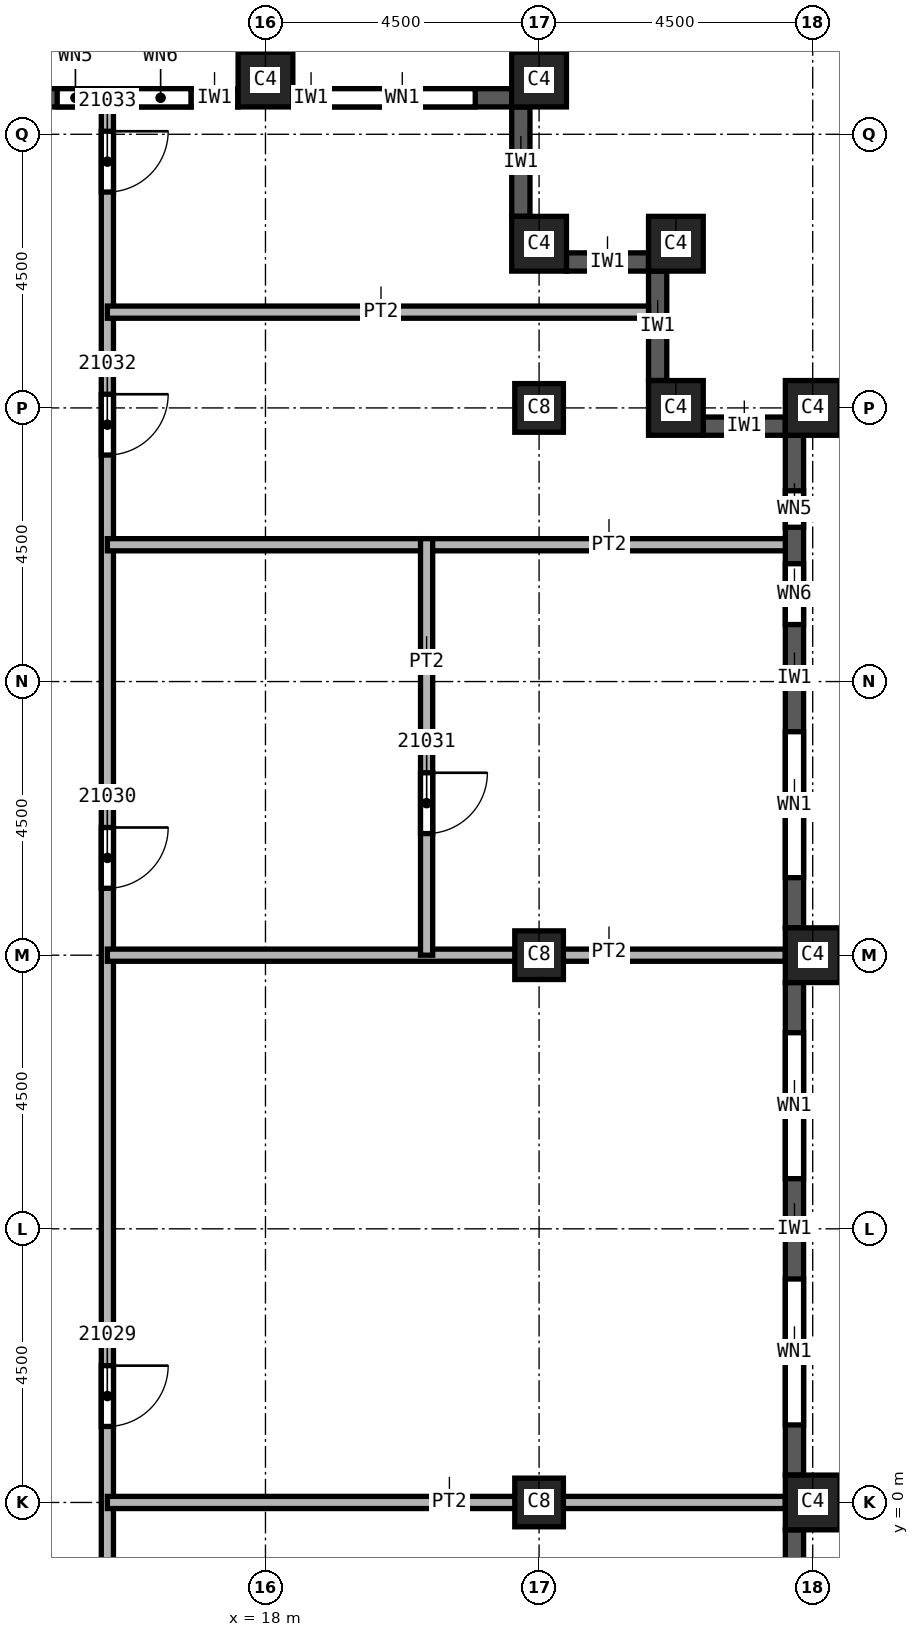
"""IFC4 building model, lengths in metres.
Left out: names, types, materials, properties, quantities, classifications, styles, units other than length and angle.
Written with IfcOpenShell. Run it as: python <this file> out.ifc"""

import sys

from ifc_helpers import new_model, si_unit, direction, frame, frame_2d, origin, origin_2d, place, context, subcontext, project, spatial, rectangle, extrude, element, fill, save


model = new_model("IFC4")
c1 = context("Model", 3, precision=1e-05, world=origin(), true_north=direction((0.0, 1.0)))
c2 = subcontext(c1, "Body", "Model", "MODEL_VIEW")
j1 = project(units=[si_unit("LENGTHUNIT", "METRE"), si_unit("PLANEANGLEUNIT", "RADIAN")], contexts=[c1])
p1 = place(None, origin())
s1 = spatial("IfcSite", under=j1, at=p1, CompositionType="ELEMENT")
p2 = place(p1, origin())
s2 = spatial("IfcBuilding", under=s1, at=p2, CompositionType="ELEMENT")
p3 = place(p2, frame((0.0, 0.0, 308.0)))
s3 = spatial("IfcBuildingStorey", under=s2, at=p3, CompositionType="ELEMENT", Elevation=308.0)
for number, where, z_axis, x_axis in (
    (1, (22.5, 0.0, 0.0), (0.0, 0.0, 1.0), (1.0, 0.0, 0.0)),
    (2, (22.5, 9.0, 0.0), (0.0, 0.0, 1.0), (1.0, 0.0, 0.0)),
    (3, (22.5, 18.0, 0.0), (0.0, 0.0, 1.0), (1.0, 0.0, 0.0)),
):
    element("IfcColumn", number, at=place(p3, frame(where, z_axis=z_axis, x_axis=x_axis)), inside=s3, PredefinedType="COLUMN", context=c2, shape_type="SweptSolid", body=[
        extrude(rectangle(XDim=0.8, YDim=0.8, at=origin_2d()), origin(), (0.0, 0.0, 1.0), 3.74),
    ])
for number, where, z_axis, x_axis in (
    (4, (27.0, 0.0, 0.0), (0.0, 0.0, 1.0), (0.0, 1.0, 0.0)),
    (5, (27.0, 9.0, 0.0), (0.0, 0.0, 1.0), (0.0, 1.0, 0.0)),
    (6, (27.0, 18.0, 0.0), (0.0, 0.0, 1.0), (0.0, 1.0, 0.0)),
    (7, (18.0, 23.4, 0.0), (0.0, 0.0, 1.0), (1.0, 0.0, 0.0)),
    (8, (22.5, 23.4, 0.0), (0.0, 0.0, 1.0), (1.0, 0.0, 0.0)),
    (9, (22.5, 20.7, 0.0), (0.0, 0.0, 1.0), (1.0, 0.0, 0.0)),
    (10, (24.75, 20.7, 0.0), (0.0, 0.0, 1.0), (1.0, 0.0, 0.0)),
    (11, (24.75, 18.0, 0.0), (0.0, 0.0, 1.0), (1.0, 0.0, 0.0)),
):
    element("IfcColumn", number, at=place(p3, frame(where, z_axis=z_axis, x_axis=x_axis)), inside=s3, PredefinedType="COLUMN", context=c2, shape_type="SweptSolid", body=[
        extrude(rectangle(XDim=0.9, YDim=0.9, at=origin_2d()), origin(), (0.0, 0.0, 1.0), 3.74),
    ])
p4 = place(p3, frame((26.7, -8.55, 0.0), z_axis=(0.0, 0.0, 1.0), x_axis=(0.0, 1.0, 0.0)))
e12 = element("IfcWall", 12, at=p4, inside=s3, PredefinedType="SOLIDWALL", context=c2, shape_type="SweptSolid", body=[
    extrude(rectangle(XDim=8.1, YDim=0.3, at=frame_2d((4.05, 0.0))), origin(), (0.0, 0.0, 1.0), 3.14),
])
p5 = place(p4, frame((0.825, 0.0, 0.8)))
e13 = element("IfcOpeningElement", 13, at=p5, cuts=e12, PredefinedType="OPENING", context=c2, shape_type="SweptSolid", body=[
    extrude(rectangle(XDim=2.4, YDim=1.95, at=frame_2d((1.2, 0.975))), frame((0.0, 0.15, 0.0), z_axis=(0.0, -1.0, 0.0), x_axis=(1.0, 0.0, 0.0)), (0.0, 0.0, 1.0), 0.3),
])
p6 = place(p4, frame((4.875, 0.0, 0.8)))
e14 = element("IfcOpeningElement", 14, at=p6, cuts=e12, PredefinedType="OPENING", context=c2, shape_type="SweptSolid", body=[
    extrude(rectangle(XDim=2.4, YDim=1.95, at=frame_2d((1.2, 0.975))), frame((0.0, 0.15, 0.0), z_axis=(0.0, -1.0, 0.0), x_axis=(1.0, 0.0, 0.0)), (0.0, 0.0, 1.0), 0.3),
])
p7 = place(p3, frame((26.7, 0.45, 0.0), z_axis=(0.0, 0.0, 1.0), x_axis=(0.0, 1.0, 0.0)))
e15 = element("IfcWall", 15, at=p7, inside=s3, PredefinedType="SOLIDWALL", context=c2, shape_type="SweptSolid", body=[
    extrude(rectangle(XDim=8.1, YDim=0.3, at=frame_2d((4.05, 0.0))), origin(), (0.0, 0.0, 1.0), 3.14),
])
p8 = place(p7, frame((0.825, 0.0, 0.8)))
e16 = element("IfcOpeningElement", 16, at=p8, cuts=e15, PredefinedType="OPENING", context=c2, shape_type="SweptSolid", body=[
    extrude(rectangle(XDim=2.4, YDim=1.95, at=frame_2d((1.2, 0.975))), frame((0.0, 0.15, 0.0), z_axis=(0.0, -1.0, 0.0), x_axis=(1.0, 0.0, 0.0)), (0.0, 0.0, 1.0), 0.3),
])
p9 = place(p7, frame((4.875, 0.0, 0.8)))
e17 = element("IfcOpeningElement", 17, at=p9, cuts=e15, PredefinedType="OPENING", context=c2, shape_type="SweptSolid", body=[
    extrude(rectangle(XDim=2.4, YDim=1.95, at=frame_2d((1.2, 0.975))), frame((0.0, 0.15, 0.0), z_axis=(0.0, -1.0, 0.0), x_axis=(1.0, 0.0, 0.0)), (0.0, 0.0, 1.0), 0.3),
])
p10 = place(p3, frame((26.7, 9.45, 0.0), z_axis=(0.0, 0.0, 1.0), x_axis=(0.0, 1.0, 0.0)))
e18 = element("IfcWall", 18, at=p10, inside=s3, PredefinedType="SOLIDWALL", context=c2, shape_type="SweptSolid", body=[
    extrude(rectangle(XDim=8.1, YDim=0.3, at=frame_2d((4.05, 0.0))), origin(), (0.0, 0.0, 1.0), 3.14),
])
p11 = place(p10, frame((0.825, 0.0, 0.8)))
e19 = element("IfcOpeningElement", 19, at=p11, cuts=e18, PredefinedType="OPENING", context=c2, shape_type="SweptSolid", body=[
    extrude(rectangle(XDim=2.4, YDim=1.95, at=frame_2d((1.2, 0.975))), frame((0.0, 0.15, 0.0), z_axis=(0.0, -1.0, 0.0), x_axis=(1.0, 0.0, 0.0)), (0.0, 0.0, 1.0), 0.3),
])
p12 = place(p10, frame((4.988, 0.0, 0.8)))
e20 = element("IfcOpeningElement", 20, at=p12, cuts=e18, PredefinedType="OPENING", context=c2, shape_type="SweptSolid", body=[
    extrude(rectangle(XDim=1.0, YDim=1.95, at=frame_2d((0.5, 0.975))), frame((0.0, 0.15, 0.0), z_axis=(0.0, -1.0, 0.0), x_axis=(1.0, 0.0, 0.0)), (0.0, 0.0, 1.0), 0.3),
])
p13 = place(p10, frame((6.587, 0.0, 0.8)))
e21 = element("IfcOpeningElement", 21, at=p13, cuts=e18, PredefinedType="OPENING", context=c2, shape_type="SweptSolid", body=[
    extrude(rectangle(XDim=0.6, YDim=1.95, at=frame_2d((0.3, 0.975))), frame((0.0, 0.15, 0.0), z_axis=(0.0, -1.0, 0.0), x_axis=(1.0, 0.0, 0.0)), (0.0, 0.0, 1.0), 0.3),
])
p14 = place(p3, frame((26.55, 17.7, 0.0), z_axis=(0.0, 0.0, 1.0), x_axis=(-1.0, 0.0, 0.0)))
e22 = element("IfcWall", 22, at=p14, inside=s3, PredefinedType="SOLIDWALL", context=c2, shape_type="SweptSolid", body=[
    extrude(rectangle(XDim=1.35, YDim=0.3, at=frame_2d((0.675, 0.0))), origin(), (0.0, 0.0, 1.0), 3.14),
])
p15 = place(p3, frame((24.45, 18.45, 0.0), z_axis=(0.0, 0.0, 1.0), x_axis=(0.0, 1.0, 0.0)))
e23 = element("IfcWall", 23, at=p15, inside=s3, PredefinedType="SOLIDWALL", context=c2, shape_type="SweptSolid", body=[
    extrude(rectangle(XDim=1.8, YDim=0.3, at=frame_2d((0.9, 0.0))), origin(), (0.0, 0.0, 1.0), 3.14),
])
p16 = place(p3, frame((24.3, 20.4, 0.0), z_axis=(0.0, 0.0, 1.0), x_axis=(-1.0, 0.0, 0.0)))
e24 = element("IfcWall", 24, at=p16, inside=s3, PredefinedType="SOLIDWALL", context=c2, shape_type="SweptSolid", body=[
    extrude(rectangle(XDim=1.35, YDim=0.3, at=frame_2d((0.675, 0.0))), origin(), (0.0, 0.0, 1.0), 3.14),
])
p17 = place(p3, frame((22.2, 21.15, 0.0), z_axis=(0.0, 0.0, 1.0), x_axis=(0.0, 1.0, 0.0)))
e25 = element("IfcWall", 25, at=p17, inside=s3, PredefinedType="SOLIDWALL", context=c2, shape_type="SweptSolid", body=[
    extrude(rectangle(XDim=1.8, YDim=0.3, at=frame_2d((0.9, 0.0))), origin(), (0.0, 0.0, 1.0), 3.14),
])
p18 = place(p3, frame((22.05, 23.1, 0.0), z_axis=(0.0, 0.0, 1.0), x_axis=(-1.0, 0.0, 0.0)))
e26 = element("IfcWall", 26, at=p18, inside=s3, PredefinedType="SOLIDWALL", context=c2, shape_type="SweptSolid", body=[
    extrude(rectangle(XDim=3.6, YDim=0.3, at=frame_2d((1.8, 0.0))), origin(), (0.0, 0.0, 1.0), 3.14),
])
p19 = place(p18, frame((0.6, 0.0, 0.8)))
e27 = element("IfcOpeningElement", 27, at=p19, cuts=e26, PredefinedType="OPENING", context=c2, shape_type="SweptSolid", body=[
    extrude(rectangle(XDim=2.4, YDim=1.95, at=frame_2d((1.2, 0.975))), frame((0.0, 0.15, 0.0), z_axis=(0.0, -1.0, 0.0), x_axis=(1.0, 0.0, 0.0)), (0.0, 0.0, 1.0), 0.3),
])
p20 = place(p3, frame((17.55, 23.1, 0.0), z_axis=(0.0, 0.0, 1.0), x_axis=(-1.0, 0.0, 0.0)))
e28 = element("IfcWall", 28, at=p20, inside=s3, PredefinedType="SOLIDWALL", context=c2, shape_type="SweptSolid", body=[
    extrude(rectangle(XDim=3.6, YDim=0.3, at=frame_2d((1.8, 0.0))), origin(), (0.0, 0.0, 1.0), 3.14),
])
p21 = place(p20, frame((0.775, 0.0, 0.8)))
e29 = element("IfcOpeningElement", 29, at=p21, cuts=e28, PredefinedType="OPENING", context=c2, shape_type="SweptSolid", body=[
    extrude(rectangle(XDim=1.0, YDim=1.95, at=frame_2d((0.5, 0.975))), frame((0.0, 0.15, 0.0), z_axis=(0.0, -1.0, 0.0), x_axis=(1.0, 0.0, 0.0)), (0.0, 0.0, 1.0), 0.3),
])
p22 = place(p20, frame((2.375, 0.0, 0.8)))
e30 = element("IfcOpeningElement", 30, at=p22, cuts=e28, PredefinedType="OPENING", context=c2, shape_type="SweptSolid", body=[
    extrude(rectangle(XDim=0.6, YDim=1.95, at=frame_2d((0.3, 0.975))), frame((0.0, 0.15, 0.0), z_axis=(0.0, -1.0, 0.0), x_axis=(1.0, 0.0, 0.0)), (0.0, 0.0, 1.0), 0.3),
])
p23 = place(p3, frame((15.4, 22.95, 0.0), z_axis=(0.0, 0.0, 1.0), x_axis=(0.0, -1.0, 0.0)))
e31 = element("IfcWall", 31, at=p23, inside=s3, PredefinedType="PARTITIONING", context=c2, shape_type="SweptSolid", body=[
    extrude(rectangle(XDim=45.9, YDim=0.2, at=frame_2d((22.95, 0.0))), origin(), (0.0, 0.0, 1.0), 3.74),
])
p24 = place(p23, frame((20.7, 0.0, 0.0)))
e32 = element("IfcOpeningElement", 32, at=p24, cuts=e31, PredefinedType="OPENING", context=c2, shape_type="SweptSolid", body=[
    extrude(rectangle(XDim=1.0, YDim=2.1, at=frame_2d((0.5, 1.05))), frame((0.0, 0.1, 0.0), z_axis=(0.0, -1.0, 0.0), x_axis=(1.0, 0.0, 0.0)), (0.0, 0.0, 1.0), 0.2),
])
p25 = place(p23, frame((11.85, 0.0, 0.0)))
e33 = element("IfcOpeningElement", 33, at=p25, cuts=e31, PredefinedType="OPENING", context=c2, shape_type="SweptSolid", body=[
    extrude(rectangle(XDim=1.0, YDim=2.1, at=frame_2d((0.5, 1.05))), frame((0.0, 0.1, 0.0), z_axis=(0.0, -1.0, 0.0), x_axis=(1.0, 0.0, 0.0)), (0.0, 0.0, 1.0), 0.2),
])
p26 = place(p23, frame((4.725, 0.0, 0.0)))
e34 = element("IfcOpeningElement", 34, at=p26, cuts=e31, PredefinedType="OPENING", context=c2, shape_type="SweptSolid", body=[
    extrude(rectangle(XDim=1.0, YDim=2.1, at=frame_2d((0.5, 1.05))), frame((0.0, 0.1, 0.0), z_axis=(0.0, -1.0, 0.0), x_axis=(1.0, 0.0, 0.0)), (0.0, 0.0, 1.0), 0.2),
])
p27 = place(p23, frame((0.4, 0.0, 0.0)))
e35 = element("IfcOpeningElement", 35, at=p27, cuts=e31, PredefinedType="OPENING", context=c2, shape_type="SweptSolid", body=[
    extrude(rectangle(XDim=1.0, YDim=2.1, at=frame_2d((0.5, 1.05))), frame((0.0, 0.1, 0.0), z_axis=(0.0, -1.0, 0.0), x_axis=(1.0, 0.0, 0.0)), (0.0, 0.0, 1.0), 0.2),
])
p28 = place(p23, frame((38.85, 0.0, 0.0)))
e36 = element("IfcOpeningElement", 36, at=p28, cuts=e31, PredefinedType="OPENING", context=c2, shape_type="SweptSolid", body=[
    extrude(rectangle(XDim=1.0, YDim=2.1, at=frame_2d((0.5, 1.05))), frame((0.0, 0.1, 0.0), z_axis=(0.0, -1.0, 0.0), x_axis=(1.0, 0.0, 0.0)), (0.0, 0.0, 1.0), 0.2),
])
p29 = place(p23, frame((26.55, 0.0, 0.0)))
e37 = element("IfcOpeningElement", 37, at=p29, cuts=e31, PredefinedType="OPENING", context=c2, shape_type="SweptSolid", body=[
    extrude(rectangle(XDim=1.0, YDim=2.1, at=frame_2d((0.5, 1.05))), frame((0.0, 0.1, 0.0), z_axis=(0.0, -1.0, 0.0), x_axis=(1.0, 0.0, 0.0)), (0.0, 0.0, 1.0), 0.2),
])
for number, where, z_axis, x_axis in (
    (38, (15.4, 9.0, 0.0), (0.0, 0.0, 1.0), (1.0, 0.0, 0.0)),
    (39, (15.4, 15.75, 0.0), (0.0, 0.0, 1.0), (1.0, 0.0, 0.0)),
):
    element("IfcWall", number, at=place(p3, frame(where, z_axis=z_axis, x_axis=x_axis)), inside=s3, PredefinedType="PARTITIONING", context=c2, shape_type="SweptSolid", body=[
        extrude(rectangle(XDim=11.15, YDim=0.2, at=frame_2d((5.575, 0.0))), origin(), (0.0, 0.0, 1.0), 3.74),
    ])
p30 = place(p3, frame((15.4, 19.575, 0.0), z_axis=(0.0, 0.0, 1.0), x_axis=(1.0, 0.0, 0.0)))
e40 = element("IfcWall", 40, at=p30, inside=s3, PredefinedType="PARTITIONING", context=c2, shape_type="SweptSolid", body=[
    extrude(rectangle(XDim=8.9, YDim=0.2, at=frame_2d((4.45, 0.0))), origin(), (0.0, 0.0, 1.0), 3.74),
])
p31 = place(p3, frame((20.65, 15.85, 0.0), z_axis=(0.0, 0.0, 1.0), x_axis=(0.0, -1.0, 0.0)))
e41 = element("IfcWall", 41, at=p31, inside=s3, PredefinedType="PARTITIONING", context=c2, shape_type="SweptSolid", body=[
    extrude(rectangle(XDim=6.85, YDim=0.2, at=frame_2d((3.425, 0.0))), origin(), (0.0, 0.0, 1.0), 3.74),
])
p32 = place(p31, frame((3.85, 0.0, 0.0)))
e42 = element("IfcOpeningElement", 42, at=p32, cuts=e41, PredefinedType="OPENING", context=c2, shape_type="SweptSolid", body=[
    extrude(rectangle(XDim=1.0, YDim=2.1, at=frame_2d((0.5, 1.05))), frame((0.0, 0.1, 0.0), z_axis=(0.0, -1.0, 0.0), x_axis=(1.0, 0.0, 0.0)), (0.0, 0.0, 1.0), 0.2),
])
p33 = place(p3, frame((26.55, 0.0, 0.0), z_axis=(0.0, 0.0, 1.0), x_axis=(-1.0, 0.0, 0.0)))
e43 = element("IfcWall", 43, at=p33, inside=s3, PredefinedType="PARTITIONING", context=c2, shape_type="SweptSolid", body=[
    extrude(rectangle(XDim=11.15, YDim=0.2, at=frame_2d((5.575, 0.0))), origin(), (0.0, 0.0, 1.0), 3.74),
])
p34 = place(p8, origin())
e44 = element("IfcWindow", 44, at=p34, inside=s3, PartitioningType="SINGLE_PANEL", PredefinedType="WINDOW", context=c2, shape_type="SweptSolid", body=[
    extrude(rectangle(XDim=2.4, YDim=1.95, at=frame_2d((1.2, 0.975))), frame((0.0, 0.03, 0.0), z_axis=(0.0, -1.0, 0.0), x_axis=(1.0, 0.0, 0.0)), (0.0, 0.0, 1.0), 0.06),
])
fill(e16, e44)
p35 = place(p9, origin())
e45 = element("IfcWindow", 45, at=p35, inside=s3, PartitioningType="SINGLE_PANEL", PredefinedType="WINDOW", context=c2, shape_type="SweptSolid", body=[
    extrude(rectangle(XDim=2.4, YDim=1.95, at=frame_2d((1.2, 0.975))), frame((0.0, 0.03, 0.0), z_axis=(0.0, -1.0, 0.0), x_axis=(1.0, 0.0, 0.0)), (0.0, 0.0, 1.0), 0.06),
])
fill(e17, e45)
p36 = place(p11, origin())
e46 = element("IfcWindow", 46, at=p36, inside=s3, PartitioningType="SINGLE_PANEL", PredefinedType="WINDOW", context=c2, shape_type="SweptSolid", body=[
    extrude(rectangle(XDim=2.4, YDim=1.95, at=frame_2d((1.2, 0.975))), frame((0.0, 0.03, 0.0), z_axis=(0.0, -1.0, 0.0), x_axis=(1.0, 0.0, 0.0)), (0.0, 0.0, 1.0), 0.06),
])
fill(e19, e46)
p37 = place(p19, origin())
e47 = element("IfcWindow", 47, at=p37, inside=s3, PartitioningType="SINGLE_PANEL", PredefinedType="WINDOW", context=c2, shape_type="SweptSolid", body=[
    extrude(rectangle(XDim=2.4, YDim=1.95, at=frame_2d((1.2, 0.975))), frame((0.0, 0.03, 0.0), z_axis=(0.0, -1.0, 0.0), x_axis=(1.0, 0.0, 0.0)), (0.0, 0.0, 1.0), 0.06),
])
fill(e27, e47)
p38 = place(p24, origin())
e48 = element("IfcDoor", 48, at=p38, inside=s3, OperationType="SINGLE_SWING_RIGHT", PredefinedType="DOOR", context=c2, shape_type="SweptSolid", body=[
    extrude(rectangle(XDim=1.0, YDim=2.1, at=frame_2d((0.5, 1.05))), frame((0.0, 0.025, 0.0), z_axis=(0.0, -1.0, 0.0), x_axis=(1.0, 0.0, 0.0)), (0.0, 0.0, 1.0), 0.05),
])
fill(e32, e48)
p39 = place(p25, origin())
e49 = element("IfcDoor", 49, at=p39, inside=s3, OperationType="SINGLE_SWING_LEFT", PredefinedType="DOOR", context=c2, shape_type="SweptSolid", body=[
    extrude(rectangle(XDim=1.0, YDim=2.1, at=frame_2d((0.5, 1.05))), frame((0.0, 0.025, 0.0), z_axis=(0.0, -1.0, 0.0), x_axis=(1.0, 0.0, 0.0)), (0.0, 0.0, 1.0), 0.05),
])
fill(e33, e49)
p40 = place(p32, origin())
e50 = element("IfcDoor", 50, at=p40, inside=s3, OperationType="SINGLE_SWING_RIGHT", PredefinedType="DOOR", context=c2, shape_type="SweptSolid", body=[
    extrude(rectangle(XDim=1.0, YDim=2.1, at=frame_2d((0.5, 1.05))), frame((0.0, 0.025, 0.0), z_axis=(0.0, -1.0, 0.0), x_axis=(1.0, 0.0, 0.0)), (0.0, 0.0, 1.0), 0.05),
])
fill(e42, e50)
p41 = place(p26, origin())
e51 = element("IfcDoor", 51, at=p41, inside=s3, OperationType="SINGLE_SWING_LEFT", PredefinedType="DOOR", context=c2, shape_type="SweptSolid", body=[
    extrude(rectangle(XDim=1.0, YDim=2.1, at=frame_2d((0.5, 1.05))), frame((0.0, 0.025, 0.0), z_axis=(0.0, -1.0, 0.0), x_axis=(1.0, 0.0, 0.0)), (0.0, 0.0, 1.0), 0.05),
])
fill(e34, e51)
p42 = place(p27, origin())
e52 = element("IfcDoor", 52, at=p42, inside=s3, OperationType="SINGLE_SWING_RIGHT", PredefinedType="DOOR", context=c2, shape_type="SweptSolid", body=[
    extrude(rectangle(XDim=1.0, YDim=2.1, at=frame_2d((0.5, 1.05))), frame((0.0, 0.025, 0.0), z_axis=(0.0, -1.0, 0.0), x_axis=(1.0, 0.0, 0.0)), (0.0, 0.0, 1.0), 0.05),
])
fill(e35, e52)
p43 = place(p12, origin())
e53 = element("IfcWindow", 53, at=p43, inside=s3, PartitioningType="SINGLE_PANEL", PredefinedType="WINDOW", context=c2, shape_type="SweptSolid", body=[
    extrude(rectangle(XDim=1.0, YDim=1.95, at=frame_2d((0.5, 0.975))), frame((0.0, 0.03, 0.0), z_axis=(0.0, -1.0, 0.0), x_axis=(1.0, 0.0, 0.0)), (0.0, 0.0, 1.0), 0.06),
])
fill(e20, e53)
p44 = place(p13, origin())
e54 = element("IfcWindow", 54, at=p44, inside=s3, PartitioningType="SINGLE_PANEL", PredefinedType="WINDOW", context=c2, shape_type="SweptSolid", body=[
    extrude(rectangle(XDim=0.6, YDim=1.95, at=frame_2d((0.3, 0.975))), frame((0.0, 0.03, 0.0), z_axis=(0.0, -1.0, 0.0), x_axis=(1.0, 0.0, 0.0)), (0.0, 0.0, 1.0), 0.06),
])
fill(e21, e54)
p45 = place(p21, origin())
e55 = element("IfcWindow", 55, at=p45, inside=s3, PartitioningType="SINGLE_PANEL", PredefinedType="WINDOW", context=c2, shape_type="SweptSolid", body=[
    extrude(rectangle(XDim=1.0, YDim=1.95, at=frame_2d((0.5, 0.975))), frame((0.0, 0.03, 0.0), z_axis=(0.0, -1.0, 0.0), x_axis=(1.0, 0.0, 0.0)), (0.0, 0.0, 1.0), 0.06),
])
fill(e29, e55)
p46 = place(p22, origin())
e56 = element("IfcWindow", 56, at=p46, inside=s3, PartitioningType="SINGLE_PANEL", PredefinedType="WINDOW", context=c2, shape_type="SweptSolid", body=[
    extrude(rectangle(XDim=0.6, YDim=1.95, at=frame_2d((0.3, 0.975))), frame((0.0, 0.03, 0.0), z_axis=(0.0, -1.0, 0.0), x_axis=(1.0, 0.0, 0.0)), (0.0, 0.0, 1.0), 0.06),
])
fill(e30, e56)
save(model, sys.argv[1])
